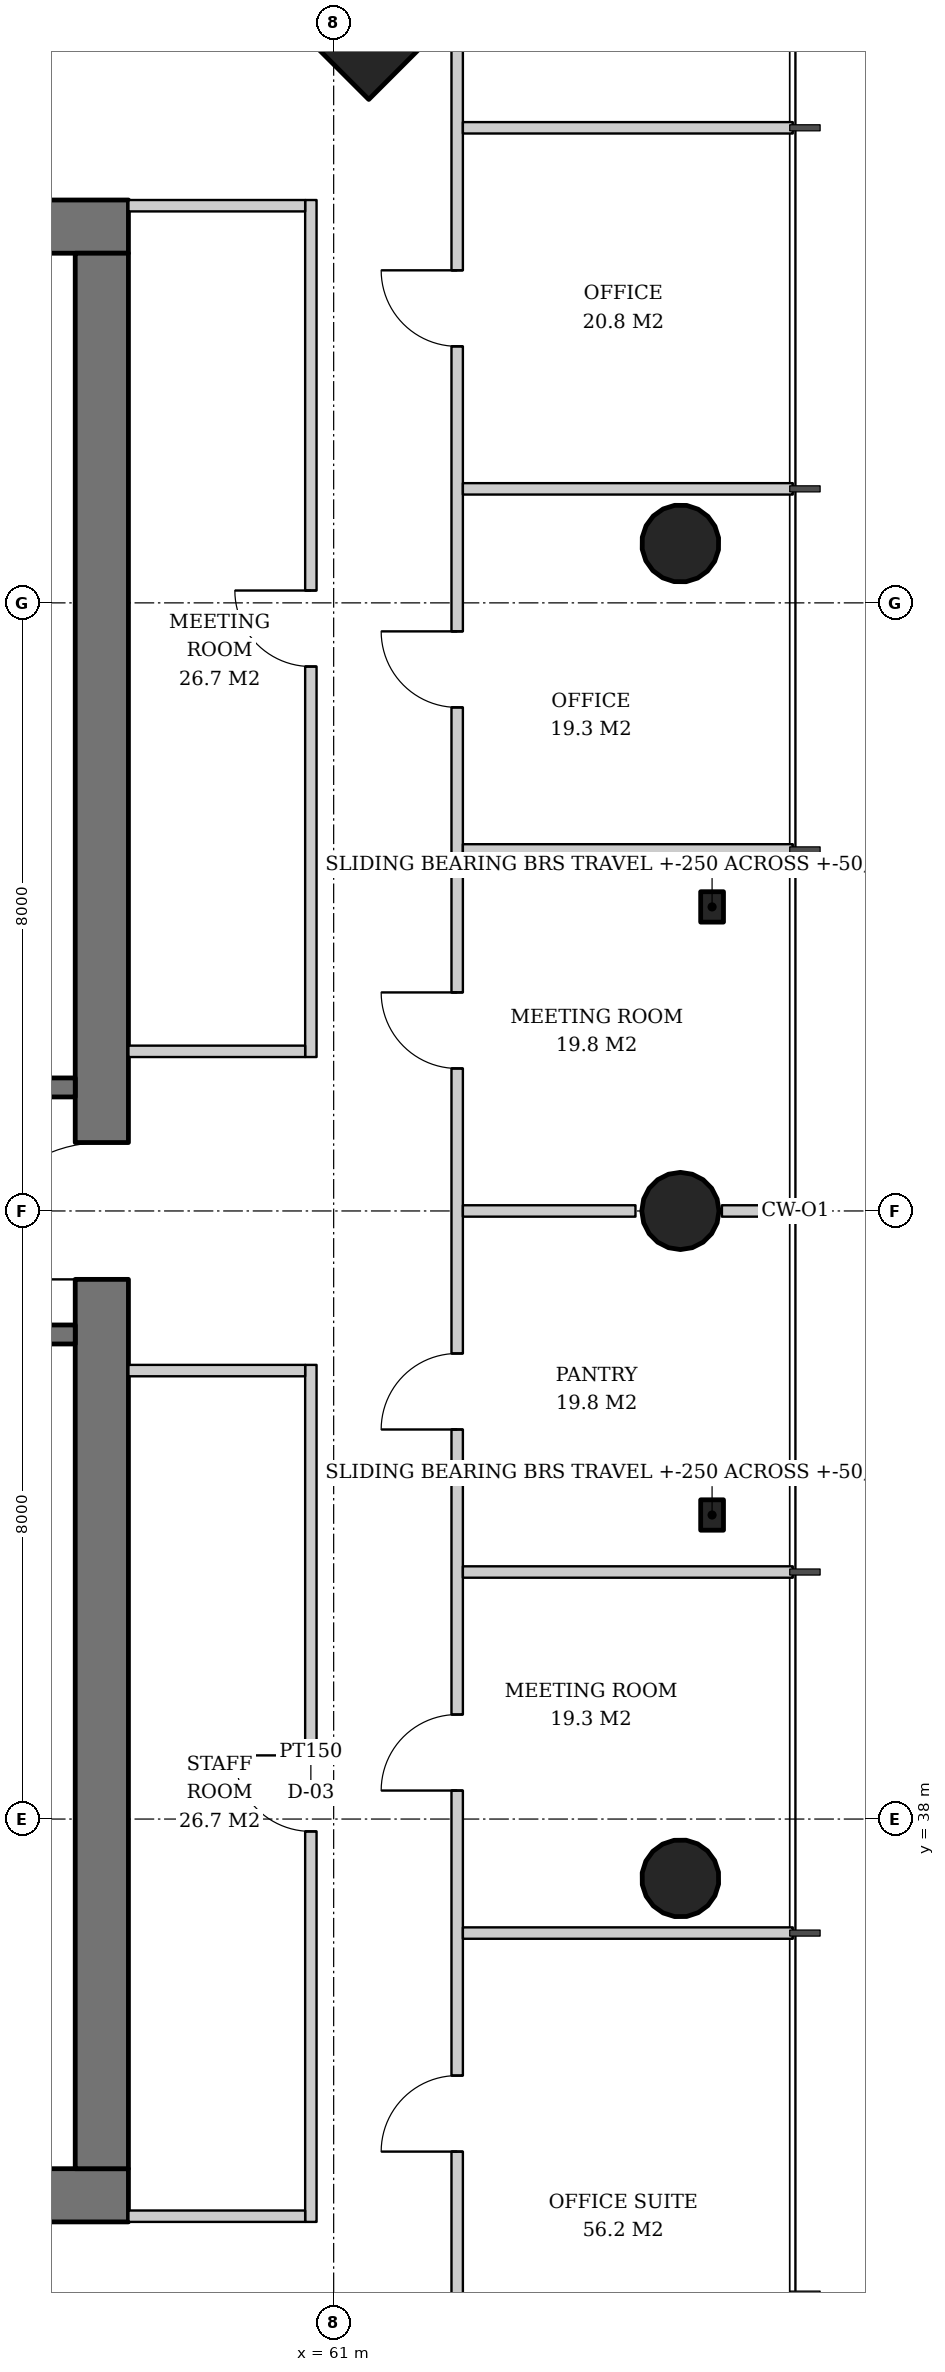
"""IFC4 building model, lengths in metres.
Left out: names, types, materials, properties, quantities, classifications, styles, units other than length and angle.
Written with IfcOpenShell. Run it as: python <this file> out.ifc"""

import sys

from ifc_helpers import new_model, si_unit, direction, frame, frame_2d, origin, origin_2d, place, context, subcontext, project, spatial, rectangle, hollow_circle, extrude, element, fill, save


model = new_model("IFC4")
c1 = context("Model", 3, precision=1e-05, world=origin(), true_north=direction((0.0, 1.0)))
c2 = subcontext(c1, "Body", "Model", "MODEL_VIEW")
j1 = project(units=[si_unit("LENGTHUNIT", "METRE"), si_unit("PLANEANGLEUNIT", "RADIAN")], contexts=[c1])
p1 = place(None, origin())
s1 = spatial("IfcSite", under=j1, at=p1, CompositionType="ELEMENT")
p2 = place(p1, origin())
s2 = spatial("IfcBuilding", under=s1, at=p2, CompositionType="ELEMENT")
p3 = place(p2, frame((0.0, 0.0, 127.4)))
s3 = spatial("IfcBuildingStorey", under=s2, at=p3, CompositionType="ELEMENT", Elevation=127.4)
p4 = place(p3, frame((61.5, 62.5, 0.0), z_axis=(-0.031898107953, -0.031898107953, 0.998981992539), x_axis=(0.707106781187, -0.707106781187, 0.0)))
e1 = element("IfcColumn", 1, at=p4, inside=s3, PredefinedType="COLUMN", context=c2, shape_type="SweptSolid", body=[
    extrude(rectangle(XDim=2.6, YDim=2.6, at=origin_2d()), origin(), (0.0, 0.0, 1.0), 3.804),
])
p5 = place(p3, frame((65.6, 37.2, 0.0), z_axis=(-0.031974409754, 0.015987204877, 0.999360818924), x_axis=(-0.4472135955, -0.894427191, 0.0)))
e2 = element("IfcColumn", 2, at=p5, inside=s3, PredefinedType="COLUMN", context=c2, shape_type="SweptSolid", body=[
    extrude(hollow_circle(Radius=0.508, WallThickness=0.04, at=origin_2d()), origin(), (0.0, 0.0, 1.0), 3.802),
])
p6 = place(p3, frame((65.6, 46.0, 0.0), z_axis=(-0.031978496719, 0.0, 0.999488557087), x_axis=(0.0, -1.0, 0.0)))
e3 = element("IfcColumn", 3, at=p6, inside=s3, PredefinedType="COLUMN", context=c2, shape_type="SweptSolid", body=[
    extrude(hollow_circle(Radius=0.508, WallThickness=0.04, at=origin_2d()), origin(), (0.0, 0.0, 1.0), 3.802),
])
p7 = place(p3, frame((65.6, 54.8, 0.0), z_axis=(-0.031974409754, -0.015987204877, 0.999360818924), x_axis=(0.4472135955, -0.894427191, 0.0)))
e4 = element("IfcColumn", 4, at=p7, inside=s3, PredefinedType="COLUMN", context=c2, shape_type="SweptSolid", body=[
    extrude(hollow_circle(Radius=0.508, WallThickness=0.04, at=origin_2d()), origin(), (0.0, 0.0, 1.0), 3.802),
])
p8 = place(p3, frame((31.7, 33.05, 0.0), z_axis=(0.0, 0.0, 1.0), x_axis=(1.0, 0.0, 0.0)))
e5 = element("IfcWall", 5, at=p8, inside=s3, PredefinedType="SHEAR", context=c2, shape_type="SweptSolid", body=[
    extrude(rectangle(XDim=26.6, YDim=0.7, at=frame_2d((13.3, 0.0))), origin(), (0.0, 0.0, 1.0), 3.8),
])
p9 = place(p8, frame((7.3, 0.0, 0.0)))
e6 = element("IfcOpeningElement", 6, at=p9, cuts=e5, PredefinedType="OPENING", context=c2, shape_type="SweptSolid", body=[
    extrude(rectangle(XDim=1.0, YDim=2.1, at=frame_2d((0.5, 1.05))), frame((0.0, 0.36, 0.0), z_axis=(0.0, -1.0, 0.0), x_axis=(1.0, 0.0, 0.0)), (0.0, 0.0, 1.0), 0.72),
])
p10 = place(p8, frame((18.75, 0.0, 0.0)))
e7 = element("IfcOpeningElement", 7, at=p10, cuts=e5, PredefinedType="OPENING", context=c2, shape_type="SweptSolid", body=[
    extrude(rectangle(XDim=1.0, YDim=2.1, at=frame_2d((0.5, 1.05))), frame((0.0, 0.36, 0.0), z_axis=(0.0, -1.0, 0.0), x_axis=(1.0, 0.0, 0.0)), (0.0, 0.0, 1.0), 0.72),
])
p11 = place(p8, frame((1.85, 0.0, 0.0)))
e8 = element("IfcOpeningElement", 8, at=p11, cuts=e5, PredefinedType="OPENING", context=c2, shape_type="SweptSolid", body=[
    extrude(rectangle(XDim=1.0, YDim=2.1, at=frame_2d((0.5, 1.05))), frame((0.0, 0.36, 0.0), z_axis=(0.0, -1.0, 0.0), x_axis=(1.0, 0.0, 0.0)), (0.0, 0.0, 1.0), 0.72),
])
p12 = place(p8, frame((4.7, 0.0, 0.0)))
e9 = element("IfcOpeningElement", 9, at=p12, cuts=e5, PredefinedType="OPENING", context=c2, shape_type="SweptSolid", body=[
    extrude(rectangle(XDim=1.0, YDim=2.1, at=frame_2d((0.5, 1.05))), frame((0.0, 0.36, 0.0), z_axis=(0.0, -1.0, 0.0), x_axis=(1.0, 0.0, 0.0)), (0.0, 0.0, 1.0), 0.72),
])
p13 = place(p8, frame((12.44, 0.0, 0.0)))
e10 = element("IfcOpeningElement", 10, at=p13, cuts=e5, PredefinedType="OPENING", context=c2, shape_type="SweptSolid", body=[
    extrude(rectangle(XDim=1.0, YDim=2.1, at=frame_2d((0.5, 1.05))), frame((0.0, 0.36, 0.0), z_axis=(0.0, -1.0, 0.0), x_axis=(1.0, 0.0, 0.0)), (0.0, 0.0, 1.0), 0.72),
])
p14 = place(p8, frame((20.644, 0.0, 0.0)))
e11 = element("IfcOpeningElement", 11, at=p14, cuts=e5, PredefinedType="OPENING", context=c2, shape_type="SweptSolid", body=[
    extrude(rectangle(XDim=1.0, YDim=2.1, at=frame_2d((0.5, 1.05))), frame((0.0, 0.36, 0.0), z_axis=(0.0, -1.0, 0.0), x_axis=(1.0, 0.0, 0.0)), (0.0, 0.0, 1.0), 0.72),
])
p15 = place(p8, frame((23.544, 0.0, 0.0)))
e12 = element("IfcOpeningElement", 12, at=p15, cuts=e5, PredefinedType="OPENING", context=c2, shape_type="SweptSolid", body=[
    extrude(rectangle(XDim=1.0, YDim=2.1, at=frame_2d((0.5, 1.05))), frame((0.0, 0.36, 0.0), z_axis=(0.0, -1.0, 0.0), x_axis=(1.0, 0.0, 0.0)), (0.0, 0.0, 1.0), 0.72),
])
p16 = place(p3, frame((31.7, 58.95, 0.0), z_axis=(0.0, 0.0, 1.0), x_axis=(1.0, 0.0, 0.0)))
e13 = element("IfcWall", 13, at=p16, inside=s3, PredefinedType="SHEAR", context=c2, shape_type="SweptSolid", body=[
    extrude(rectangle(XDim=26.6, YDim=0.7, at=frame_2d((13.3, 0.0))), origin(), (0.0, 0.0, 1.0), 3.8),
])
p17 = place(p16, frame((17.94, 0.0, 0.0)))
e14 = element("IfcOpeningElement", 14, at=p17, cuts=e13, PredefinedType="OPENING", context=c2, shape_type="SweptSolid", body=[
    extrude(rectangle(XDim=1.0, YDim=2.1, at=frame_2d((0.5, 1.05))), frame((0.0, 0.36, 0.0), z_axis=(0.0, -1.0, 0.0), x_axis=(1.0, 0.0, 0.0)), (0.0, 0.0, 1.0), 0.72),
])
p18 = place(p16, frame((5.825, 0.0, 0.0)))
e15 = element("IfcOpeningElement", 15, at=p18, cuts=e13, PredefinedType="OPENING", context=c2, shape_type="SweptSolid", body=[
    extrude(rectangle(XDim=1.0, YDim=2.1, at=frame_2d((0.5, 1.05))), frame((0.0, 0.36, 0.0), z_axis=(0.0, -1.0, 0.0), x_axis=(1.0, 0.0, 0.0)), (0.0, 0.0, 1.0), 0.72),
])
p19 = place(p16, frame((2.587, 0.0, 0.0)))
e16 = element("IfcOpeningElement", 16, at=p19, cuts=e13, PredefinedType="OPENING", context=c2, shape_type="SweptSolid", body=[
    extrude(rectangle(XDim=1.0, YDim=2.1, at=frame_2d((0.5, 1.05))), frame((0.0, 0.36, 0.0), z_axis=(0.0, -1.0, 0.0), x_axis=(1.0, 0.0, 0.0)), (0.0, 0.0, 1.0), 0.72),
])
p20 = place(p16, frame((8.44, 0.0, 0.0)))
e17 = element("IfcOpeningElement", 17, at=p20, cuts=e13, PredefinedType="OPENING", context=c2, shape_type="SweptSolid", body=[
    extrude(rectangle(XDim=1.0, YDim=2.1, at=frame_2d((0.5, 1.05))), frame((0.0, 0.36, 0.0), z_axis=(0.0, -1.0, 0.0), x_axis=(1.0, 0.0, 0.0)), (0.0, 0.0, 1.0), 0.72),
])
p21 = place(p16, frame((13.342, 0.0, 0.0)))
e18 = element("IfcOpeningElement", 18, at=p21, cuts=e13, PredefinedType="OPENING", context=c2, shape_type="SweptSolid", body=[
    extrude(rectangle(XDim=1.0, YDim=2.1, at=frame_2d((0.5, 1.05))), frame((0.0, 0.36, 0.0), z_axis=(0.0, -1.0, 0.0), x_axis=(1.0, 0.0, 0.0)), (0.0, 0.0, 1.0), 0.72),
])
p22 = place(p16, frame((22.4, 0.0, 0.0)))
e19 = element("IfcOpeningElement", 19, at=p22, cuts=e13, PredefinedType="OPENING", context=c2, shape_type="SweptSolid", body=[
    extrude(rectangle(XDim=1.0, YDim=2.1, at=frame_2d((0.5, 1.05))), frame((0.0, 0.36, 0.0), z_axis=(0.0, -1.0, 0.0), x_axis=(1.0, 0.0, 0.0)), (0.0, 0.0, 1.0), 0.72),
])
p23 = place(p3, frame((57.95, 33.4, 0.0), z_axis=(0.0, 0.0, 1.0), x_axis=(0.0, 1.0, 0.0)))
e20 = element("IfcWall", 20, at=p23, inside=s3, PredefinedType="SHEAR", context=c2, shape_type="SweptSolid", body=[
    extrude(rectangle(XDim=25.2, YDim=0.7, at=frame_2d((12.6, 0.0))), origin(), (0.0, 0.0, 1.0), 3.8),
])
p24 = place(p23, frame((11.7, 0.0, 0.0)))
e21 = element("IfcOpeningElement", 21, at=p24, cuts=e20, PredefinedType="OPENING", context=c2, shape_type="SweptSolid", body=[
    extrude(rectangle(XDim=1.8, YDim=2.4, at=frame_2d((0.9, 1.2))), frame((0.0, 0.36, 0.0), z_axis=(0.0, -1.0, 0.0), x_axis=(1.0, 0.0, 0.0)), (0.0, 0.0, 1.0), 0.72),
])
for number, where, z_axis, x_axis in (
    (22, (65.979, 42.0, 0.0), (0.0, 0.0, 1.0), (1.0, 0.0, 0.0)),
    (23, (65.979, 50.0, 0.0), (0.0, 0.0, 1.0), (1.0, 0.0, 0.0)),
):
    element("IfcColumn", number, at=place(p3, frame(where, z_axis=z_axis, x_axis=x_axis)), inside=s3, PredefinedType="COLUMN", context=c2, shape_type="SweptSolid", body=[
        extrude(rectangle(XDim=0.3, YDim=0.4, at=origin_2d()), origin(), (0.0, 0.0, 1.0), 2.548),
    ])
for number, where, z_axis, x_axis in (
    (24, (54.9, 44.375, 0.0), (0.0, 0.0, 1.0), (1.0, 0.0, 0.0)),
    (25, (54.9, 47.625, 0.0), (0.0, 0.0, 1.0), (1.0, 0.0, 0.0)),
):
    element("IfcWall", number, at=place(p3, frame(where, z_axis=z_axis, x_axis=x_axis)), inside=s3, PredefinedType="SOLIDWALL", context=c2, shape_type="SweptSolid", body=[
        extrude(rectangle(XDim=2.7, YDim=0.25, at=frame_2d((1.35, 0.0))), origin(), (0.0, 0.0, 1.0), 3.62),
    ])
p25 = place(p3, frame((60.7, 32.7, 0.0), z_axis=(0.0, 0.0, 1.0), x_axis=(0.0, 1.0, 0.0)))
e26 = element("IfcWall", 26, at=p25, inside=s3, PredefinedType="PARTITIONING", context=c2, shape_type="SweptSolid", body=[
    extrude(rectangle(XDim=11.275, YDim=0.15, at=frame_2d((5.638, 0.0))), origin(), (0.0, 0.0, 1.0), 2.72),
])
p26 = place(p25, frame((5.137, 0.0, 0.0)))
e27 = element("IfcOpeningElement", 27, at=p26, cuts=e26, PredefinedType="OPENING", context=c2, shape_type="SweptSolid", body=[
    extrude(rectangle(XDim=1.0, YDim=2.1, at=frame_2d((0.5, 1.05))), frame((0.0, 0.085, 0.0), z_axis=(0.0, -1.0, 0.0), x_axis=(1.0, 0.0, 0.0)), (0.0, 0.0, 1.0), 0.17),
])
for number, where, z_axis, x_axis in (
    (28, (58.3, 32.775, 0.0), (0.0, 0.0, 1.0), (1.0, 0.0, 0.0)),
    (29, (58.3, 43.9, 0.0), (0.0, 0.0, 1.0), (1.0, 0.0, 0.0)),
):
    element("IfcWall", number, at=place(p3, frame(where, z_axis=z_axis, x_axis=x_axis)), inside=s3, PredefinedType="PARTITIONING", context=c2, shape_type="SweptSolid", body=[
        extrude(rectangle(XDim=2.325, YDim=0.15, at=frame_2d((1.163, 0.0))), origin(), (0.0, 0.0, 1.0), 3.62),
    ])
p27 = place(p3, frame((60.7, 48.025, 0.0), z_axis=(0.0, 0.0, 1.0), x_axis=(0.0, 1.0, 0.0)))
e30 = element("IfcWall", 30, at=p27, inside=s3, PredefinedType="PARTITIONING", context=c2, shape_type="SweptSolid", body=[
    extrude(rectangle(XDim=11.275, YDim=0.15, at=frame_2d((5.638, 0.0))), origin(), (0.0, 0.0, 1.0), 2.806),
])
p28 = place(p27, frame((5.137, 0.0, 0.0)))
e31 = element("IfcOpeningElement", 31, at=p28, cuts=e30, PredefinedType="OPENING", context=c2, shape_type="SweptSolid", body=[
    extrude(rectangle(XDim=1.0, YDim=2.1, at=frame_2d((0.5, 1.05))), frame((0.0, 0.085, 0.0), z_axis=(0.0, -1.0, 0.0), x_axis=(1.0, 0.0, 0.0)), (0.0, 0.0, 1.0), 0.17),
])
for number, where, z_axis, x_axis in (
    (32, (58.3, 48.1, 0.0), (0.0, 0.0, 1.0), (1.0, 0.0, 0.0)),
    (33, (58.3, 59.225, 0.0), (0.0, 0.0, 1.0), (1.0, 0.0, 0.0)),
):
    element("IfcWall", number, at=place(p3, frame(where, z_axis=z_axis, x_axis=x_axis)), inside=s3, PredefinedType="PARTITIONING", context=c2, shape_type="SweptSolid", body=[
        extrude(rectangle(XDim=2.325, YDim=0.15, at=frame_2d((1.163, 0.0))), origin(), (0.0, 0.0, 1.0), 3.62),
    ])
p29 = place(p3, frame((62.625, 30.289, 0.0), z_axis=(0.0, 0.0, 1.0), x_axis=(0.0, 1.0, 0.0)))
e34 = element("IfcWall", 34, at=p29, inside=s3, PredefinedType="PARTITIONING", context=c2, shape_type="SweptSolid", body=[
    extrude(rectangle(XDim=31.423, YDim=0.15, at=frame_2d((15.711, 0.0))), origin(), (0.0, 0.0, 1.0), 2.72),
])
p30 = place(p29, frame((3.336, 0.0, 0.0)))
e35 = element("IfcOpeningElement", 35, at=p30, cuts=e34, PredefinedType="OPENING", context=c2, shape_type="SweptSolid", body=[
    extrude(rectangle(XDim=1.0, YDim=2.1, at=frame_2d((0.5, 1.05))), frame((0.0, 0.085, 0.0), z_axis=(0.0, -1.0, 0.0), x_axis=(1.0, 0.0, 0.0)), (0.0, 0.0, 1.0), 0.17),
])
p31 = place(p29, frame((8.086, 0.0, 0.0)))
e36 = element("IfcOpeningElement", 36, at=p31, cuts=e34, PredefinedType="OPENING", context=c2, shape_type="SweptSolid", body=[
    extrude(rectangle(XDim=1.0, YDim=2.1, at=frame_2d((0.5, 1.05))), frame((0.0, 0.085, 0.0), z_axis=(0.0, -1.0, 0.0), x_axis=(1.0, 0.0, 0.0)), (0.0, 0.0, 1.0), 0.17),
])
p32 = place(p29, frame((12.836, 0.0, 0.0)))
e37 = element("IfcOpeningElement", 37, at=p32, cuts=e34, PredefinedType="OPENING", context=c2, shape_type="SweptSolid", body=[
    extrude(rectangle(XDim=1.0, YDim=2.1, at=frame_2d((0.5, 1.05))), frame((0.0, 0.085, 0.0), z_axis=(0.0, -1.0, 0.0), x_axis=(1.0, 0.0, 0.0)), (0.0, 0.0, 1.0), 0.17),
])
p33 = place(p29, frame((17.586, 0.0, 0.0)))
e38 = element("IfcOpeningElement", 38, at=p33, cuts=e34, PredefinedType="OPENING", context=c2, shape_type="SweptSolid", body=[
    extrude(rectangle(XDim=1.0, YDim=2.1, at=frame_2d((0.5, 1.05))), frame((0.0, 0.085, 0.0), z_axis=(0.0, -1.0, 0.0), x_axis=(1.0, 0.0, 0.0)), (0.0, 0.0, 1.0), 0.17),
])
p34 = place(p29, frame((22.336, 0.0, 0.0)))
e39 = element("IfcOpeningElement", 39, at=p34, cuts=e34, PredefinedType="OPENING", context=c2, shape_type="SweptSolid", body=[
    extrude(rectangle(XDim=1.0, YDim=2.1, at=frame_2d((0.5, 1.05))), frame((0.0, 0.085, 0.0), z_axis=(0.0, -1.0, 0.0), x_axis=(1.0, 0.0, 0.0)), (0.0, 0.0, 1.0), 0.17),
])
p35 = place(p29, frame((27.086, 0.0, 0.0)))
e40 = element("IfcOpeningElement", 40, at=p35, cuts=e34, PredefinedType="OPENING", context=c2, shape_type="SweptSolid", body=[
    extrude(rectangle(XDim=1.0, YDim=2.1, at=frame_2d((0.5, 1.05))), frame((0.0, 0.085, 0.0), z_axis=(0.0, -1.0, 0.0), x_axis=(1.0, 0.0, 0.0)), (0.0, 0.0, 1.0), 0.17),
])
for number, where, z_axis, x_axis in (
    (41, (62.7, 36.5, 0.0), (0.0, 0.0, 1.0), (1.0, 0.0, 0.0)),
    (42, (62.7, 41.25, 0.0), (0.0, 0.0, 1.0), (1.0, 0.0, 0.0)),
):
    element("IfcWall", number, at=place(p3, frame(where, z_axis=z_axis, x_axis=x_axis)), inside=s3, PredefinedType="PARTITIONING", context=c2, shape_type="SweptSolid", body=[
        extrude(rectangle(XDim=4.34, YDim=0.15, at=frame_2d((2.17, 0.0))), origin(), (0.0, 0.0, 1.0), 2.82),
    ])
p36 = place(p3, frame((62.7, 46.0, 0.0), z_axis=(0.0, 0.0, 1.0), x_axis=(1.0, 0.0, 0.0)))
e43 = element("IfcWall", 43, at=p36, inside=s3, PredefinedType="PARTITIONING", context=c2, shape_type="SweptSolid", body=[
    extrude(rectangle(XDim=2.271, YDim=0.15, at=frame_2d((1.135, 0.0))), origin(), (0.0, 0.0, 1.0), 3.62),
])
p37 = place(p3, frame((66.108, 46.0, 0.0), z_axis=(0.0, 0.0, 1.0), x_axis=(1.0, 0.0, 0.0)))
e44 = element("IfcWall", 44, at=p37, inside=s3, PredefinedType="PARTITIONING", context=c2, shape_type="SweptSolid", body=[
    extrude(rectangle(XDim=0.932, YDim=0.15, at=frame_2d((0.466, 0.0))), origin(), (0.0, 0.0, 1.0), 3.62),
])
for number, where, z_axis, x_axis in (
    (45, (62.7, 50.75, 0.0), (0.0, 0.0, 1.0), (1.0, 0.0, 0.0)),
    (46, (62.7, 55.5, 0.0), (0.0, 0.0, 1.0), (1.0, 0.0, 0.0)),
    (47, (62.7, 60.25, 0.0), (0.0, 0.0, 1.0), (1.0, 0.0, 0.0)),
):
    element("IfcWall", number, at=place(p3, frame(where, z_axis=z_axis, x_axis=x_axis)), inside=s3, PredefinedType="PARTITIONING", context=c2, shape_type="SweptSolid", body=[
        extrude(rectangle(XDim=4.34, YDim=0.15, at=frame_2d((2.17, 0.0))), origin(), (0.0, 0.0, 1.0), 2.82),
    ])
p38 = place(p24, origin())
e48 = element("IfcDoor", 48, at=p38, inside=s3, OperationType="DOUBLE_DOOR_SINGLE_SWING", PredefinedType="DOOR", context=c2, shape_type="SweptSolid", body=[
    extrude(rectangle(XDim=1.8, YDim=2.4, at=frame_2d((0.9, 1.2))), frame((0.0, 0.025, 0.0), z_axis=(0.0, -1.0, 0.0), x_axis=(1.0, 0.0, 0.0)), (0.0, 0.0, 1.0), 0.05),
])
fill(e21, e48)
p39 = place(p26, origin())
e49 = element("IfcDoor", 49, at=p39, inside=s3, OperationType="SINGLE_SWING_RIGHT", PredefinedType="DOOR", context=c2, shape_type="SweptSolid", body=[
    extrude(rectangle(XDim=1.0, YDim=2.1, at=frame_2d((0.5, 1.05))), frame((0.0, 0.025, 0.0), z_axis=(0.0, -1.0, 0.0), x_axis=(1.0, 0.0, 0.0)), (0.0, 0.0, 1.0), 0.05),
])
fill(e27, e49)
p40 = place(p28, origin())
e50 = element("IfcDoor", 50, at=p40, inside=s3, OperationType="SINGLE_SWING_RIGHT", PredefinedType="DOOR", context=c2, shape_type="SweptSolid", body=[
    extrude(rectangle(XDim=1.0, YDim=2.1, at=frame_2d((0.5, 1.05))), frame((0.0, 0.025, 0.0), z_axis=(0.0, -1.0, 0.0), x_axis=(1.0, 0.0, 0.0)), (0.0, 0.0, 1.0), 0.05),
])
fill(e31, e50)
p41 = place(p30, origin())
e51 = element("IfcDoor", 51, at=p41, inside=s3, OperationType="SINGLE_SWING_LEFT", PredefinedType="DOOR", context=c2, shape_type="SweptSolid", body=[
    extrude(rectangle(XDim=1.0, YDim=2.1, at=frame_2d((0.5, 1.05))), frame((0.0, 0.025, 0.0), z_axis=(0.0, -1.0, 0.0), x_axis=(1.0, 0.0, 0.0)), (0.0, 0.0, 1.0), 0.05),
])
fill(e35, e51)
p42 = place(p31, origin())
e52 = element("IfcDoor", 52, at=p42, inside=s3, OperationType="SINGLE_SWING_LEFT", PredefinedType="DOOR", context=c2, shape_type="SweptSolid", body=[
    extrude(rectangle(XDim=1.0, YDim=2.1, at=frame_2d((0.5, 1.05))), frame((0.0, 0.025, 0.0), z_axis=(0.0, -1.0, 0.0), x_axis=(1.0, 0.0, 0.0)), (0.0, 0.0, 1.0), 0.05),
])
fill(e36, e52)
p43 = place(p32, origin())
e53 = element("IfcDoor", 53, at=p43, inside=s3, OperationType="SINGLE_SWING_LEFT", PredefinedType="DOOR", context=c2, shape_type="SweptSolid", body=[
    extrude(rectangle(XDim=1.0, YDim=2.1, at=frame_2d((0.5, 1.05))), frame((0.0, 0.025, 0.0), z_axis=(0.0, -1.0, 0.0), x_axis=(1.0, 0.0, 0.0)), (0.0, 0.0, 1.0), 0.05),
])
fill(e37, e53)
p44 = place(p33, origin())
e54 = element("IfcDoor", 54, at=p44, inside=s3, OperationType="SINGLE_SWING_RIGHT", PredefinedType="DOOR", context=c2, shape_type="SweptSolid", body=[
    extrude(rectangle(XDim=1.0, YDim=2.1, at=frame_2d((0.5, 1.05))), frame((0.0, 0.025, 0.0), z_axis=(0.0, -1.0, 0.0), x_axis=(1.0, 0.0, 0.0)), (0.0, 0.0, 1.0), 0.05),
])
fill(e38, e54)
p45 = place(p34, origin())
e55 = element("IfcDoor", 55, at=p45, inside=s3, OperationType="SINGLE_SWING_RIGHT", PredefinedType="DOOR", context=c2, shape_type="SweptSolid", body=[
    extrude(rectangle(XDim=1.0, YDim=2.1, at=frame_2d((0.5, 1.05))), frame((0.0, 0.025, 0.0), z_axis=(0.0, -1.0, 0.0), x_axis=(1.0, 0.0, 0.0)), (0.0, 0.0, 1.0), 0.05),
])
fill(e39, e55)
p46 = place(p35, origin())
e56 = element("IfcDoor", 56, at=p46, inside=s3, OperationType="SINGLE_SWING_RIGHT", PredefinedType="DOOR", context=c2, shape_type="SweptSolid", body=[
    extrude(rectangle(XDim=1.0, YDim=2.1, at=frame_2d((0.5, 1.05))), frame((0.0, 0.025, 0.0), z_axis=(0.0, -1.0, 0.0), x_axis=(1.0, 0.0, 0.0)), (0.0, 0.0, 1.0), 0.05),
])
fill(e40, e56)
save(model, sys.argv[1])
